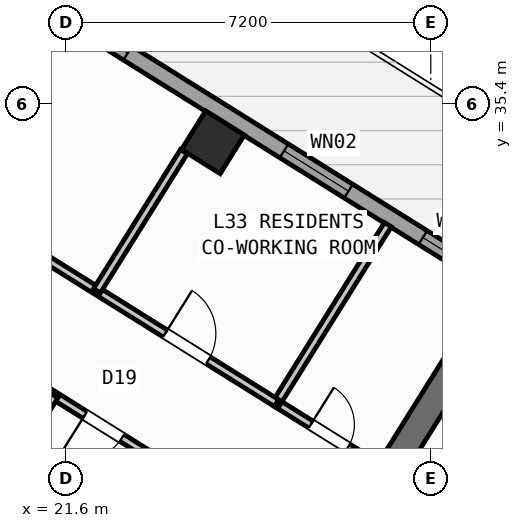
"""IFC4 building model, lengths in metres.
Left out: names, types, materials, properties, quantities, classifications, styles, units other than length and angle.
Written with IfcOpenShell. Run it as: python <this file> out.ifc"""

import sys

from ifc_helpers import new_model, si_unit, direction, frame, frame_2d, origin, origin_2d, place, context, subcontext, project, spatial, rectangle, hollow_rectangle, extrude, source, transform, mapped, element, fill, save


model = new_model("IFC4")
c1 = context("Model", 3, precision=1e-05, world=origin(), true_north=direction((0.0, 1.0)))
c2 = subcontext(c1, "Body", "Model", "MODEL_VIEW")
j1 = project(units=[si_unit("LENGTHUNIT", "METRE"), si_unit("PLANEANGLEUNIT", "RADIAN")], contexts=[c1])
p1 = place(None, origin())
s1 = spatial("IfcSite", under=j1, at=p1, CompositionType="ELEMENT")
p2 = place(p1, origin())
s2 = spatial("IfcBuilding", under=s1, at=p2, CompositionType="ELEMENT")
p3 = place(p2, frame((0.0, 0.0, 132.6)))
s3 = spatial("IfcBuildingStorey", under=s2, at=p3, CompositionType="ELEMENT", Elevation=132.6)
p4 = place(p3, frame((29.517, 30.594, 0.0), z_axis=(0.0, 0.0, 1.0), x_axis=(-0.529906864564, -0.848055844204, 0.0)))
e1 = element("IfcWall", 1, at=p4, inside=s3, PredefinedType="SHEAR", context=c2, shape_type="SweptSolid", body=[
    extrude(rectangle(XDim=3.575, YDim=0.55, at=frame_2d((1.788, 0.0))), origin(), (0.0, 0.0, 1.0), 3.32),
])
m1 = source(origin(), c2, "Body", "SweptSolid", [
    extrude(hollow_rectangle(XDim=0.9, YDim=0.9, WallThickness=0.036, at=origin_2d()), origin(), (0.0, 0.0, 1.0), 3.6),
])
p5 = place(p3, frame((24.5, 34.643, 0.0), z_axis=(0.0, 0.0, 1.0), x_axis=(-0.848048096156, 0.529919264233, 0.0)))
e2 = element("IfcColumn", 2, at=p5, inside=s3, PredefinedType="COLUMN", context=c2, shape_type="MappedRepresentation", body=[
    mapped(m1, transform((0.0, 0.0, 0.0), scale=1.0)),
])
p6 = place(p3, frame((14.138, 41.825, 0.0), z_axis=(0.0, 0.0, 1.0), x_axis=(0.848046498049, -0.529921821731, 0.0)))
e3 = element("IfcWall", 3, at=p6, inside=s3, PredefinedType="STANDARD", context=c2, shape_type="SweptSolid", body=[
    extrude(rectangle(XDim=31.588, YDim=0.32, at=frame_2d((15.794, 0.0))), origin(), (0.0, 0.0, 1.0), 3.32),
])
p7 = place(p6, frame((3.253, 0.0, 0.0)))
e4 = element("IfcOpeningElement", 4, at=p7, cuts=e3, PredefinedType="OPENING", context=c2, shape_type="SweptSolid", body=[
    extrude(rectangle(XDim=1.05, YDim=2.15, at=frame_2d((0.525, 1.075))), frame((0.0, 0.17, 0.0), z_axis=(0.0, -1.0, 0.0), x_axis=(1.0, 0.0, 0.0)), (0.0, 0.0, 1.0), 0.34),
])
p8 = place(p6, frame((0.863, 0.0, 0.85)))
e5 = element("IfcOpeningElement", 5, at=p8, cuts=e3, PredefinedType="OPENING", context=c2, shape_type="SweptSolid", body=[
    extrude(rectangle(XDim=1.8, YDim=1.5, at=frame_2d((0.9, 0.75))), frame((0.0, 0.17, 0.0), z_axis=(0.0, -1.0, 0.0), x_axis=(1.0, 0.0, 0.0)), (0.0, 0.0, 1.0), 0.34),
])
p9 = place(p6, frame((8.435, 0.0, 0.85)))
e6 = element("IfcOpeningElement", 6, at=p9, cuts=e3, PredefinedType="OPENING", context=c2, shape_type="SweptSolid", body=[
    extrude(rectangle(XDim=1.8, YDim=1.5, at=frame_2d((0.9, 0.75))), frame((0.0, 0.17, 0.0), z_axis=(0.0, -1.0, 0.0), x_axis=(1.0, 0.0, 0.0)), (0.0, 0.0, 1.0), 0.34),
])
p10 = place(p6, frame((13.874, 0.0, 0.85)))
e7 = element("IfcOpeningElement", 7, at=p10, cuts=e3, PredefinedType="OPENING", context=c2, shape_type="SweptSolid", body=[
    extrude(rectangle(XDim=1.5, YDim=1.5, at=frame_2d((0.75, 0.75))), frame((0.0, 0.17, 0.0), z_axis=(0.0, -1.0, 0.0), x_axis=(1.0, 0.0, 0.0)), (0.0, 0.0, 1.0), 0.34),
])
p11 = place(p6, frame((17.104, 0.0, 1.0)))
e8 = element("IfcOpeningElement", 8, at=p11, cuts=e3, PredefinedType="OPENING", context=c2, shape_type="SweptSolid", body=[
    extrude(rectangle(XDim=0.9, YDim=1.25, at=frame_2d((0.45, 0.625))), frame((0.0, 0.17, 0.0), z_axis=(0.0, -1.0, 0.0), x_axis=(1.0, 0.0, 0.0)), (0.0, 0.0, 1.0), 0.34),
])
p12 = place(p6, frame((22.131, 0.0, 1.0)))
e9 = element("IfcOpeningElement", 9, at=p12, cuts=e3, PredefinedType="OPENING", context=c2, shape_type="SweptSolid", body=[
    extrude(rectangle(XDim=0.9, YDim=1.25, at=frame_2d((0.45, 0.625))), frame((0.0, 0.17, 0.0), z_axis=(0.0, -1.0, 0.0), x_axis=(1.0, 0.0, 0.0)), (0.0, 0.0, 1.0), 0.34),
])
p13 = place(p6, frame((27.706, 0.0, 1.0)))
e10 = element("IfcOpeningElement", 10, at=p13, cuts=e3, PredefinedType="OPENING", context=c2, shape_type="SweptSolid", body=[
    extrude(rectangle(XDim=0.9, YDim=1.25, at=frame_2d((0.45, 0.625))), frame((0.0, 0.17, 0.0), z_axis=(0.0, -1.0, 0.0), x_axis=(1.0, 0.0, 0.0)), (0.0, 0.0, 1.0), 0.34),
])
p14 = place(p3, frame((27.711, 28.274, 0.0), z_axis=(0.0, 0.0, 1.0), x_axis=(-0.848075553449, 0.529875320846, 0.0)))
e11 = element("IfcWall", 11, at=p14, inside=s3, PredefinedType="PARTITIONING", context=c2, shape_type="SweptSolid", body=[
    extrude(rectangle(XDim=2.308, YDim=0.16, at=frame_2d((1.154, 0.0))), origin(), (0.0, 0.0, 1.0), 3.31),
])
p15 = place(p14, frame((0.648, 0.0, 0.0)))
e12 = element("IfcOpeningElement", 12, at=p15, cuts=e11, PredefinedType="OPENING", context=c2, shape_type="SweptSolid", body=[
    extrude(rectangle(XDim=0.86, YDim=2.05, at=frame_2d((0.43, 1.025))), frame((0.0, 0.09, 0.0), z_axis=(0.0, -1.0, 0.0), x_axis=(1.0, 0.0, 0.0)), (0.0, 0.0, 1.0), 0.18),
])
p16 = place(p3, frame((27.953, 33.016, 0.0), z_axis=(0.0, 0.0, 1.0), x_axis=(-0.529872022255, -0.848077614391, 0.0)))
e13 = element("IfcWall", 13, at=p16, inside=s3, PredefinedType="PARTITIONING", context=c2, shape_type="SweptSolid", body=[
    extrude(rectangle(XDim=4.15, YDim=0.16, at=frame_2d((2.075, 0.0))), origin(), (0.0, 0.0, 1.0), 3.31),
])
p17 = place(p3, frame((25.754, 29.497, 0.0), z_axis=(0.0, 0.0, 1.0), x_axis=(-0.848045850158, 0.529922858565, 0.0)))
e14 = element("IfcWall", 14, at=p17, inside=s3, PredefinedType="PARTITIONING", context=c2, shape_type="SweptSolid", body=[
    extrude(rectangle(XDim=16.73, YDim=0.16, at=frame_2d((8.365, 0.0))), origin(), (0.0, 0.0, 1.0), 3.31),
])
p18 = place(p17, frame((1.588, 0.0, 0.0)))
e15 = element("IfcOpeningElement", 15, at=p18, cuts=e14, PredefinedType="OPENING", context=c2, shape_type="SweptSolid", body=[
    extrude(rectangle(XDim=1.0, YDim=2.1, at=frame_2d((0.5, 1.05))), frame((0.0, 0.09, 0.0), z_axis=(0.0, -1.0, 0.0), x_axis=(1.0, 0.0, 0.0)), (0.0, 0.0, 1.0), 0.18),
])
p19 = place(p17, frame((6.685, 0.0, 0.0)))
e16 = element("IfcOpeningElement", 16, at=p19, cuts=e14, PredefinedType="OPENING", context=c2, shape_type="SweptSolid", body=[
    extrude(rectangle(XDim=1.0, YDim=2.1, at=frame_2d((0.5, 1.05))), frame((0.0, 0.09, 0.0), z_axis=(0.0, -1.0, 0.0), x_axis=(1.0, 0.0, 0.0)), (0.0, 0.0, 1.0), 0.18),
])
p20 = place(p17, frame((12.951, 0.0, 0.0)))
e17 = element("IfcOpeningElement", 17, at=p20, cuts=e14, PredefinedType="OPENING", context=c2, shape_type="SweptSolid", body=[
    extrude(rectangle(XDim=1.0, YDim=2.1, at=frame_2d((0.5, 1.05))), frame((0.0, 0.09, 0.0), z_axis=(0.0, -1.0, 0.0), x_axis=(1.0, 0.0, 0.0)), (0.0, 0.0, 1.0), 0.18),
])
p21 = place(p3, frame((24.588, 27.631, 0.0), z_axis=(0.0, 0.0, 1.0), x_axis=(-0.848041752158, 0.529929416617, 0.0)))
e18 = element("IfcWall", 18, at=p21, inside=s3, PredefinedType="PARTITIONING", context=c2, shape_type="SweptSolid", body=[
    extrude(rectangle(XDim=16.73, YDim=0.16, at=frame_2d((8.365, 0.0))), origin(), (0.0, 0.0, 1.0), 3.31),
])
p22 = place(p21, frame((2.22, 0.0, 0.0)))
e19 = element("IfcOpeningElement", 19, at=p22, cuts=e18, PredefinedType="OPENING", context=c2, shape_type="SweptSolid", body=[
    extrude(rectangle(XDim=0.86, YDim=2.05, at=frame_2d((0.43, 1.025))), frame((0.0, 0.09, 0.0), z_axis=(0.0, -1.0, 0.0), x_axis=(1.0, 0.0, 0.0)), (0.0, 0.0, 1.0), 0.18),
])
p23 = place(p21, frame((7.82, 0.0, 0.0)))
e20 = element("IfcOpeningElement", 20, at=p23, cuts=e18, PredefinedType="OPENING", context=c2, shape_type="SweptSolid", body=[
    extrude(rectangle(XDim=1.0, YDim=2.1, at=frame_2d((0.5, 1.05))), frame((0.0, 0.09, 0.0), z_axis=(0.0, -1.0, 0.0), x_axis=(1.0, 0.0, 0.0)), (0.0, 0.0, 1.0), 0.18),
])
p24 = place(p21, frame((12.95, 0.0, 0.0)))
e21 = element("IfcOpeningElement", 21, at=p24, cuts=e18, PredefinedType="OPENING", context=c2, shape_type="SweptSolid", body=[
    extrude(rectangle(XDim=1.0, YDim=2.1, at=frame_2d((0.5, 1.05))), frame((0.0, 0.09, 0.0), z_axis=(0.0, -1.0, 0.0), x_axis=(1.0, 0.0, 0.0)), (0.0, 0.0, 1.0), 0.18),
])
p25 = place(p3, frame((21.374, 29.639, 0.0), z_axis=(0.0, 0.0, 1.0), x_axis=(-0.529952145338, -0.848027548876, 0.0)))
e22 = element("IfcWall", 22, at=p25, inside=s3, PredefinedType="PARTITIONING", context=c2, shape_type="SweptSolid", body=[
    extrude(rectangle(XDim=0.938, YDim=0.16, at=frame_2d((0.469, 0.0))), origin(), (0.0, 0.0, 1.0), 2.745),
])
p26 = place(p3, frame((23.927, 34.456, 0.0), z_axis=(0.0, 0.0, 1.0), x_axis=(-0.529978607573, -0.848011011435, 0.0)))
e23 = element("IfcWall", 23, at=p26, inside=s3, PredefinedType="PARTITIONING", context=c2, shape_type="SweptSolid", body=[
    extrude(rectangle(XDim=3.238, YDim=0.16, at=frame_2d((1.619, 0.0))), origin(), (0.0, 0.0, 1.0), 3.31),
])
m2 = source(origin(), c2, "Body", "SweptSolid", [
    extrude(rectangle(XDim=1.8, YDim=1.5, at=frame_2d((0.9, 0.75))), frame((0.0, 0.03, 0.0), z_axis=(0.0, -1.0, 0.0), x_axis=(1.0, 0.0, 0.0)), (0.0, 0.0, 1.0), 0.06),
])
p27 = place(p9, origin())
e24 = element("IfcWindow", 24, at=p27, inside=s3, PartitioningType="SINGLE_PANEL", PredefinedType="WINDOW", context=c2, shape_type="MappedRepresentation", body=[
    mapped(m2, transform((0.0, 0.0, 0.0), scale=1.0)),
])
fill(e6, e24)
m3 = source(origin(), c2, "Body", "SweptSolid", [
    extrude(rectangle(XDim=1.5, YDim=1.5, at=frame_2d((0.75, 0.75))), frame((0.0, 0.03, 0.0), z_axis=(0.0, -1.0, 0.0), x_axis=(1.0, 0.0, 0.0)), (0.0, 0.0, 1.0), 0.06),
])
p28 = place(p10, origin())
e25 = element("IfcWindow", 25, at=p28, inside=s3, PartitioningType="SINGLE_PANEL", PredefinedType="WINDOW", context=c2, shape_type="MappedRepresentation", body=[
    mapped(m3, transform((0.0, 0.0, 0.0), scale=1.0)),
])
fill(e7, e25)
m4 = source(origin(), c2, "Body", "SweptSolid", [
    extrude(rectangle(XDim=0.9, YDim=1.25, at=frame_2d((0.45, 0.625))), frame((0.0, 0.03, 0.0), z_axis=(0.0, -1.0, 0.0), x_axis=(1.0, 0.0, 0.0)), (0.0, 0.0, 1.0), 0.06),
])
p29 = place(p11, origin())
e26 = element("IfcWindow", 26, at=p29, inside=s3, PartitioningType="SINGLE_PANEL", PredefinedType="WINDOW", context=c2, shape_type="MappedRepresentation", body=[
    mapped(m4, transform((0.0, 0.0, 0.0), scale=1.0)),
])
fill(e8, e26)
m5 = source(origin(), c2, "Body", "SweptSolid", [
    extrude(rectangle(XDim=0.86, YDim=2.05, at=frame_2d((0.43, 1.025))), frame((0.0, 0.025, 0.0), z_axis=(0.0, -1.0, 0.0), x_axis=(1.0, 0.0, 0.0)), (0.0, 0.0, 1.0), 0.05),
])
p30 = place(p15, frame((0.86, 0.0, 0.0), z_axis=(0.0, 0.0, 1.0), x_axis=(-1.0, 0.0, 0.0)))
e27 = element("IfcDoor", 27, at=p30, inside=s3, OperationType="SINGLE_SWING_LEFT", PredefinedType="DOOR", context=c2, shape_type="MappedRepresentation", body=[
    mapped(m5, transform((0.0, 0.0, 0.0), scale=1.0)),
])
fill(e12, e27)
p31 = place(p22, origin())
e28 = element("IfcDoor", 28, at=p31, inside=s3, OperationType="SINGLE_SWING_RIGHT", PredefinedType="DOOR", context=c2, shape_type="MappedRepresentation", body=[
    mapped(m5, transform((0.0, 0.0, 0.0), scale=1.0)),
])
fill(e19, e28)
m6 = source(origin(), c2, "Body", "SweptSolid", [
    extrude(rectangle(XDim=1.0, YDim=2.1, at=frame_2d((0.5, 1.05))), frame((0.0, 0.025, 0.0), z_axis=(0.0, -1.0, 0.0), x_axis=(1.0, 0.0, 0.0)), (0.0, 0.0, 1.0), 0.05),
])
p32 = place(p18, frame((1.0, 0.0, 0.0), z_axis=(0.0, 0.0, 1.0), x_axis=(-1.0, 0.0, 0.0)))
e29 = element("IfcDoor", 29, at=p32, inside=s3, OperationType="SINGLE_SWING_LEFT", PredefinedType="DOOR", context=c2, shape_type="MappedRepresentation", body=[
    mapped(m6, transform((0.0, 0.0, 0.0), scale=1.0)),
])
fill(e15, e29)
save(model, sys.argv[1])
